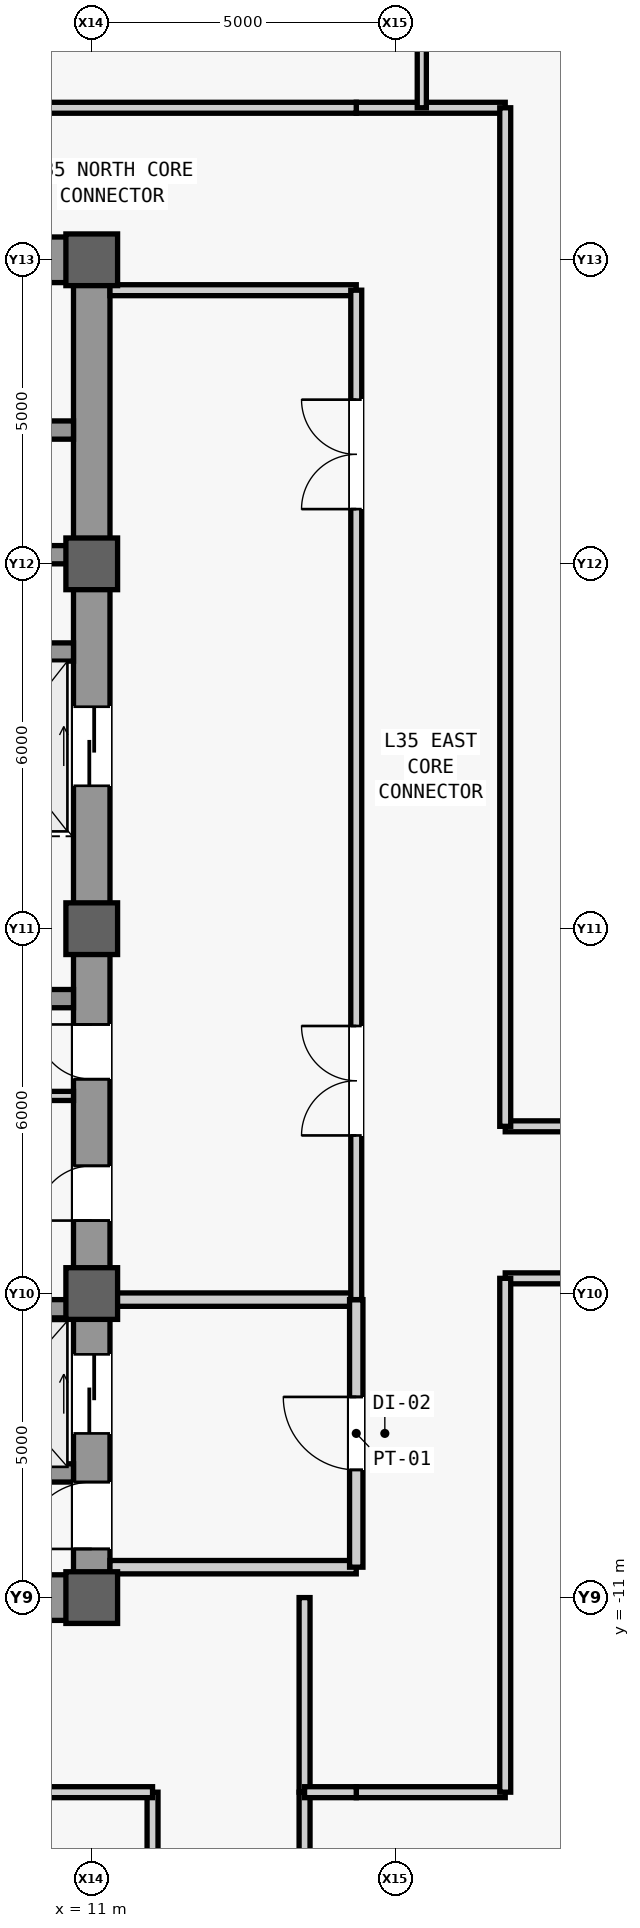
"""IFC4 building model, lengths in metres.
Left out: names, types, materials, properties, quantities, classifications, styles, units other than length and angle.
Written with IfcOpenShell. Run it as: python <this file> out.ifc"""

import sys

from ifc_helpers import new_model, si_unit, direction, frame, frame_2d, origin, origin_2d, place, context, subcontext, project, spatial, rectangle, extrude, source, transform, mapped, element, fill, save


model = new_model("IFC4")
c1 = context("Model", 3, precision=1e-05, world=origin(), true_north=direction((0.0, 1.0)))
c2 = subcontext(c1, "Body", "Model", "MODEL_VIEW")
j1 = project(units=[si_unit("LENGTHUNIT", "METRE"), si_unit("PLANEANGLEUNIT", "RADIAN")], contexts=[c1])
p1 = place(None, origin())
s1 = spatial("IfcSite", under=j1, at=p1, CompositionType="ELEMENT")
p2 = place(p1, origin())
s2 = spatial("IfcBuilding", under=s1, at=p2, CompositionType="ELEMENT")
p3 = place(p2, frame((0.0, 0.0, 155.1)))
s3 = spatial("IfcBuildingStorey", under=s2, at=p3, CompositionType="ELEMENT", Elevation=155.1)
m1 = source(origin(), c2, "Body", "SweptSolid", [
    extrude(rectangle(XDim=22.0, YDim=0.6, at=frame_2d((11.0, 0.0))), origin(), (0.0, 0.0, 1.0), 3.78),
])
p4 = place(p3, frame((11.0, -11.0, 0.0), z_axis=(0.0, 0.0, 1.0), x_axis=(0.0, 1.0, 0.0)))
e1 = element("IfcWall", 1, at=p4, inside=s3, PredefinedType="SHEAR", context=c2, shape_type="MappedRepresentation", body=[
    mapped(m1, transform((0.0, 0.0, 0.0), scale=1.0)),
])
m2 = source(origin(), c2, "Body", "SweptSolid", [
    extrude(rectangle(XDim=1.1, YDim=2.2, at=frame_2d((0.55, 1.1))), frame((0.0, 0.31, 0.0), z_axis=(0.0, -1.0, 0.0), x_axis=(1.0, 0.0, 0.0)), (0.0, 0.0, 1.0), 0.62),
])
p5 = place(p4, frame((0.8, 0.0, 0.0)))
e2 = element("IfcOpeningElement", 2, at=p5, cuts=e1, PredefinedType="OPENING", context=c2, shape_type="MappedRepresentation", body=[
    mapped(m2, transform((0.0, 0.0, 0.0), scale=1.0)),
])
m3 = source(origin(), c2, "Body", "SweptSolid", [
    extrude(rectangle(XDim=0.9, YDim=2.15, at=frame_2d((0.45, 1.075))), frame((0.0, 0.31, 0.0), z_axis=(0.0, -1.0, 0.0), x_axis=(1.0, 0.0, 0.0)), (0.0, 0.0, 1.0), 0.62),
])
p6 = place(p4, frame((6.2, 0.0, 0.0)))
e3 = element("IfcOpeningElement", 3, at=p6, cuts=e1, PredefinedType="OPENING", context=c2, shape_type="MappedRepresentation", body=[
    mapped(m3, transform((0.0, 0.0, 0.0), scale=1.0)),
])
p7 = place(p4, frame((8.525, 0.0, 0.0)))
e4 = element("IfcOpeningElement", 4, at=p7, cuts=e1, PredefinedType="OPENING", context=c2, shape_type="MappedRepresentation", body=[
    mapped(m3, transform((0.0, 0.0, 0.0), scale=1.0)),
])
m4 = source(origin(), c2, "Body", "SweptSolid", [
    extrude(rectangle(XDim=1.3, YDim=2.3, at=frame_2d((0.65, 1.15))), frame((0.0, 0.31, 0.0), z_axis=(0.0, -1.0, 0.0), x_axis=(1.0, 0.0, 0.0)), (0.0, 0.0, 1.0), 0.62),
])
p8 = place(p4, frame((2.7, 0.0, 0.0)))
e5 = element("IfcOpeningElement", 5, at=p8, cuts=e1, PredefinedType="OPENING", context=c2, shape_type="MappedRepresentation", body=[
    mapped(m4, transform((0.0, 0.0, 0.0), scale=1.0)),
])
p9 = place(p4, frame((13.35, 0.0, 0.0)))
e6 = element("IfcOpeningElement", 6, at=p9, cuts=e1, PredefinedType="OPENING", context=c2, shape_type="MappedRepresentation", body=[
    mapped(m4, transform((0.0, 0.0, 0.0), scale=1.0)),
])
m5 = source(origin(), c2, "Body", "SweptSolid", [
    extrude(rectangle(XDim=5.85, YDim=0.75, at=frame_2d((2.925, 0.0))), origin(), (0.0, 0.0, 1.0), 3.78),
])
p10 = place(p3, frame((4.85, -11.0, 0.0), z_axis=(0.0, 0.0, 1.0), x_axis=(1.0, 0.0, 0.0)))
e7 = element("IfcWall", 7, at=p10, inside=s3, PredefinedType="SHEAR", context=c2, shape_type="MappedRepresentation", body=[
    mapped(m5, transform((0.0, 0.0, 0.0), scale=1.0)),
])
p11 = place(p3, frame((4.85, 11.0, 0.0), z_axis=(0.0, 0.0, 1.0), x_axis=(1.0, 0.0, 0.0)))
e8 = element("IfcWall", 8, at=p11, inside=s3, PredefinedType="SHEAR", context=c2, shape_type="MappedRepresentation", body=[
    mapped(m5, transform((0.0, 0.0, 0.0), scale=1.0)),
])
m6 = source(origin(), c2, "Body", "SweptSolid", [
    extrude(rectangle(XDim=1.05, YDim=2.2, at=frame_2d((0.525, 1.1))), frame((0.0, 0.385, 0.0), z_axis=(0.0, -1.0, 0.0), x_axis=(1.0, 0.0, 0.0)), (0.0, 0.0, 1.0), 0.77),
])
p12 = place(p11, frame((1.375, 0.0, 0.0)))
e9 = element("IfcOpeningElement", 9, at=p12, cuts=e8, PredefinedType="OPENING", context=c2, shape_type="MappedRepresentation", body=[
    mapped(m6, transform((0.0, 0.0, 0.0), scale=1.0)),
])
m7 = source(origin(), c2, "Body", "SweptSolid", [
    extrude(rectangle(XDim=5.6, YDim=0.3, at=frame_2d((2.8, 0.0))), origin(), (0.0, 0.0, 1.0), 3.78),
])
p13 = place(p3, frame((5.1, -1.15, 0.0), z_axis=(0.0, 0.0, 1.0), x_axis=(1.0, 0.0, 0.0)))
e10 = element("IfcWall", 10, at=p13, inside=s3, PredefinedType="SHEAR", context=c2, shape_type="MappedRepresentation", body=[
    mapped(m7, transform((0.0, 0.0, 0.0), scale=1.0)),
])
m8 = source(origin(), c2, "Body", "SweptSolid", [
    extrude(rectangle(XDim=0.85, YDim=0.85, at=origin_2d()), origin(), (0.0, 0.0, 1.0), 4.0),
])
for number, where, z_axis, x_axis in (
    (11, (11.0, -11.0, 0.0), (0.0, 0.0, 1.0), (1.0, 0.0, 0.0)),
    (12, (11.0, -6.0, 0.0), (0.0, 0.0, 1.0), (1.0, 0.0, 0.0)),
    (13, (11.0, 0.0, 0.0), (0.0, 0.0, 1.0), (1.0, 0.0, 0.0)),
    (14, (11.0, 6.0, 0.0), (0.0, 0.0, 1.0), (1.0, 0.0, 0.0)),
    (15, (11.0, 11.0, 0.0), (0.0, 0.0, 1.0), (1.0, 0.0, 0.0)),
):
    element("IfcColumn", number, at=place(p3, frame(where, z_axis=z_axis, x_axis=x_axis)), inside=s3, PredefinedType="COLUMN", context=c2, shape_type="MappedRepresentation", body=[
        mapped(m8, transform((0.0, 0.0, 0.0), scale=1.0)),
    ])
m9 = source(origin(), c2, "Body", "SweptSolid", [
    extrude(rectangle(XDim=2.2, YDim=0.3, at=frame_2d((1.1, 0.0))), origin(), (0.0, 0.0, 1.0), 3.78),
])
for number, where, z_axis, x_axis in (
    (16, (8.5, -8.95, 0.0), (0.0, 0.0, 1.0), (1.0, 0.0, 0.0)),
    (17, (8.5, -6.25, 0.0), (0.0, 0.0, 1.0), (1.0, 0.0, 0.0)),
):
    element("IfcWall", number, at=place(p3, frame(where, z_axis=z_axis, x_axis=x_axis)), inside=s3, PredefinedType="SHEAR", context=c2, shape_type="MappedRepresentation", body=[
        mapped(m9, transform((0.0, 0.0, 0.0), scale=1.0)),
    ])
m10 = source(origin(), c2, "Body", "SweptSolid", [
    extrude(rectangle(XDim=2.3, YDim=0.3, at=frame_2d((1.15, 0.0))), origin(), (0.0, 0.0, 1.0), 3.78),
])
for number, where, z_axis, x_axis in (
    (18, (8.4, 4.55, 0.0), (0.0, 0.0, 1.0), (1.0, 0.0, 0.0)),
    (19, (8.4, 6.15, 0.0), (0.0, 0.0, 1.0), (1.0, 0.0, 0.0)),
    (20, (8.4, 8.2, 0.0), (0.0, 0.0, 1.0), (1.0, 0.0, 0.0)),
):
    element("IfcWall", number, at=place(p3, frame(where, z_axis=z_axis, x_axis=x_axis)), inside=s3, PredefinedType="SHEAR", context=c2, shape_type="MappedRepresentation", body=[
        mapped(m10, transform((0.0, 0.0, 0.0), scale=1.0)),
    ])
m11 = source(origin(), c2, "Body", "SweptSolid", [
    extrude(rectangle(XDim=2.05, YDim=0.15, at=frame_2d((1.025, 0.0))), origin(), (0.0, 0.0, 1.0), 3.78),
])
p14 = place(p3, frame((8.65, -2.75, 0.0), z_axis=(0.0, 0.0, 1.0), x_axis=(1.0, 0.0, 0.0)))
e21 = element("IfcWall", 21, at=p14, inside=s3, PredefinedType="PARTITIONING", context=c2, shape_type="MappedRepresentation", body=[
    mapped(m11, transform((0.0, 0.0, 0.0), scale=1.0)),
])
m12 = source(origin(), c2, "Body", "SweptSolid", [
    extrude(rectangle(XDim=4.05, YDim=0.22, at=frame_2d((2.025, 0.0))), origin(), (0.0, 0.0, 1.0), 3.78),
])
p15 = place(p3, frame((11.3, -10.5, 0.0), z_axis=(0.0, 0.0, 1.0), x_axis=(1.0, 0.0, 0.0)))
e22 = element("IfcWall", 22, at=p15, inside=s3, PredefinedType="PARTITIONING", context=c2, shape_type="MappedRepresentation", body=[
    mapped(m12, transform((0.0, 0.0, 0.0), scale=1.0)),
])
m13 = source(origin(), c2, "Body", "SweptSolid", [
    extrude(rectangle(XDim=4.05, YDim=0.22, at=frame_2d((2.025, 0.0))), origin(), (0.0, 0.0, 1.0), 3.007),
])
p16 = place(p3, frame((11.3, -6.1, 0.0), z_axis=(0.0, 0.0, 1.0), x_axis=(1.0, 0.0, 0.0)))
e23 = element("IfcWall", 23, at=p16, inside=s3, PredefinedType="PARTITIONING", context=c2, shape_type="MappedRepresentation", body=[
    mapped(m13, transform((0.0, 0.0, 0.0), scale=1.0)),
])
m14 = source(origin(), c2, "Body", "SweptSolid", [
    extrude(rectangle(XDim=4.4, YDim=0.22, at=frame_2d((2.2, 0.0))), origin(), (0.0, 0.0, 1.0), 3.78),
])
p17 = place(p3, frame((15.35, -10.5, 0.0), z_axis=(0.0, 0.0, 1.0), x_axis=(0.0, 1.0, 0.0)))
e24 = element("IfcWall", 24, at=p17, inside=s3, PredefinedType="PARTITIONING", context=c2, shape_type="MappedRepresentation", body=[
    mapped(m14, transform((0.0, 0.0, 0.0), scale=1.0)),
])
m15 = source(origin(), c2, "Body", "SweptSolid", [
    extrude(rectangle(XDim=1.2, YDim=2.2, at=frame_2d((0.6, 1.1))), frame((0.0, 0.12, 0.0), z_axis=(0.0, -1.0, 0.0), x_axis=(1.0, 0.0, 0.0)), (0.0, 0.0, 1.0), 0.24),
])
p18 = place(p17, frame((1.6, 0.0, 0.0)))
e25 = element("IfcOpeningElement", 25, at=p18, cuts=e24, PredefinedType="OPENING", context=c2, shape_type="MappedRepresentation", body=[
    mapped(m15, transform((0.0, 0.0, 0.0), scale=1.0)),
])
m16 = source(origin(), c2, "Body", "SweptSolid", [
    extrude(rectangle(XDim=4.05, YDim=0.18, at=frame_2d((2.025, 0.0))), origin(), (0.0, 0.0, 1.0), 3.78),
])
p19 = place(p3, frame((11.3, 10.5, 0.0), z_axis=(0.0, 0.0, 1.0), x_axis=(1.0, 0.0, 0.0)))
e26 = element("IfcWall", 26, at=p19, inside=s3, PredefinedType="PARTITIONING", context=c2, shape_type="MappedRepresentation", body=[
    mapped(m16, transform((0.0, 0.0, 0.0), scale=1.0)),
])
m17 = source(origin(), c2, "Body", "SweptSolid", [
    extrude(rectangle(XDim=16.6, YDim=0.18, at=frame_2d((8.3, 0.0))), origin(), (0.0, 0.0, 1.0), 3.78),
])
p20 = place(p3, frame((15.35, -6.1, 0.0), z_axis=(0.0, 0.0, 1.0), x_axis=(0.0, 1.0, 0.0)))
e27 = element("IfcWall", 27, at=p20, inside=s3, PredefinedType="PARTITIONING", context=c2, shape_type="MappedRepresentation", body=[
    mapped(m17, transform((0.0, 0.0, 0.0), scale=1.0)),
])
m18 = source(origin(), c2, "Body", "SweptSolid", [
    extrude(rectangle(XDim=1.8, YDim=2.25, at=frame_2d((0.9, 1.125))), frame((0.0, 0.1, 0.0), z_axis=(0.0, -1.0, 0.0), x_axis=(1.0, 0.0, 0.0)), (0.0, 0.0, 1.0), 0.2),
])
p21 = place(p20, frame((2.7, 0.0, 0.0)))
e28 = element("IfcOpeningElement", 28, at=p21, cuts=e27, PredefinedType="OPENING", context=c2, shape_type="MappedRepresentation", body=[
    mapped(m18, transform((0.0, 0.0, 0.0), scale=1.0)),
])
p22 = place(p20, frame((13.0, 0.0, 0.0)))
e29 = element("IfcOpeningElement", 29, at=p22, cuts=e27, PredefinedType="OPENING", context=c2, shape_type="MappedRepresentation", body=[
    mapped(m18, transform((0.0, 0.0, 0.0), scale=1.0)),
])
m19 = source(origin(), c2, "Body", "SweptSolid", [
    extrude(rectangle(XDim=2.45, YDim=0.18, at=frame_2d((1.225, 0.0))), origin(), (0.0, 0.0, 1.0), 3.78),
])
for number, where, z_axis, x_axis in (
    (30, (15.35, -14.2, 0.0), (0.0, 0.0, 1.0), (1.0, 0.0, 0.0)),
    (31, (15.35, 13.5, 0.0), (0.0, 0.0, 1.0), (1.0, 0.0, 0.0)),
):
    element("IfcWall", number, at=place(p3, frame(where, z_axis=z_axis, x_axis=x_axis)), inside=s3, PredefinedType="PARTITIONING", context=c2, shape_type="MappedRepresentation", body=[
        mapped(m19, transform((0.0, 0.0, 0.0), scale=1.0)),
    ])
m20 = source(origin(), c2, "Body", "SweptSolid", [
    extrude(rectangle(XDim=3.2, YDim=0.18, at=frame_2d((1.6, 0.0))), origin(), (0.0, 0.0, 1.0), 3.78),
])
p23 = place(p3, frame((14.5, -14.2, 0.0), z_axis=(0.0, 0.0, 1.0), x_axis=(0.0, 1.0, 0.0)))
e32 = element("IfcWall", 32, at=p23, inside=s3, PredefinedType="PARTITIONING", context=c2, shape_type="MappedRepresentation", body=[
    mapped(m20, transform((0.0, 0.0, 0.0), scale=1.0)),
])
m21 = source(origin(), c2, "Body", "SweptSolid", [
    extrude(rectangle(XDim=15.8, YDim=0.18, at=frame_2d((7.9, 0.0))), origin(), (0.0, 0.0, 1.0), 3.78),
])
p24 = place(p3, frame((12.0, -30.0, 0.0), z_axis=(0.0, 0.0, 1.0), x_axis=(0.0, 1.0, 0.0)))
e33 = element("IfcWall", 33, at=p24, inside=s3, PredefinedType="PARTITIONING", context=c2, shape_type="MappedRepresentation", body=[
    mapped(m21, transform((0.0, 0.0, 0.0), scale=1.0)),
])
m22 = source(origin(), c2, "Body", "SweptSolid", [
    extrude(rectangle(XDim=1.05, YDim=2.2, at=frame_2d((0.525, 1.1))), frame((0.0, 0.1, 0.0), z_axis=(0.0, -1.0, 0.0), x_axis=(1.0, 0.0, 0.0)), (0.0, 0.0, 1.0), 0.2),
])
p25 = place(p24, frame((3.425, 0.0, 0.0)))
e34 = element("IfcOpeningElement", 34, at=p25, cuts=e33, PredefinedType="OPENING", context=c2, shape_type="MappedRepresentation", body=[
    mapped(m22, transform((0.0, 0.0, 0.0), scale=1.0)),
])
m23 = source(origin(), c2, "Body", "SweptSolid", [
    extrude(rectangle(XDim=27.35, YDim=0.18, at=frame_2d((13.675, 0.0))), origin(), (0.0, 0.0, 1.0), 3.78),
])
p26 = place(p3, frame((-15.35, -14.2, 0.0), z_axis=(0.0, 0.0, 1.0), x_axis=(1.0, 0.0, 0.0)))
e35 = element("IfcWall", 35, at=p26, inside=s3, PredefinedType="PARTITIONING", context=c2, shape_type="MappedRepresentation", body=[
    mapped(m23, transform((0.0, 0.0, 0.0), scale=1.0)),
])
p27 = place(p3, frame((14.5, -30.0, 0.0), z_axis=(0.0, 0.0, 1.0), x_axis=(0.0, 1.0, 0.0)))
e36 = element("IfcWall", 36, at=p27, inside=s3, PredefinedType="PARTITIONING", context=c2, shape_type="MappedRepresentation", body=[
    mapped(m21, transform((0.0, 0.0, 0.0), scale=1.0)),
])
p28 = place(p27, frame((3.425, 0.0, 0.0)))
e37 = element("IfcOpeningElement", 37, at=p28, cuts=e36, PredefinedType="OPENING", context=c2, shape_type="MappedRepresentation", body=[
    mapped(m22, transform((0.0, 0.0, 0.0), scale=1.0)),
])
m24 = source(origin(), c2, "Body", "SweptSolid", [
    extrude(rectangle(XDim=0.85, YDim=0.18, at=frame_2d((0.425, 0.0))), origin(), (0.0, 0.0, 1.0), 3.78),
])
p29 = place(p3, frame((14.5, -14.2, 0.0), z_axis=(0.0, 0.0, 1.0), x_axis=(1.0, 0.0, 0.0)))
e38 = element("IfcWall", 38, at=p29, inside=s3, PredefinedType="PARTITIONING", context=c2, shape_type="MappedRepresentation", body=[
    mapped(m24, transform((0.0, 0.0, 0.0), scale=1.0)),
])
m25 = source(origin(), c2, "Body", "SweptSolid", [
    extrude(rectangle(XDim=16.5, YDim=0.15, at=frame_2d((8.25, 0.0))), origin(), (0.0, 0.0, 1.0), 3.78),
])
p30 = place(p3, frame((16.428, 13.5, 0.0), z_axis=(0.0, 0.0, 1.0), x_axis=(0.0, 1.0, 0.0)))
e39 = element("IfcWall", 39, at=p30, inside=s3, PredefinedType="PARTITIONING", context=c2, shape_type="MappedRepresentation", body=[
    mapped(m25, transform((0.0, 0.0, 0.0), scale=1.0)),
])
m26 = source(origin(), c2, "Body", "SweptSolid", [
    extrude(rectangle(XDim=0.95, YDim=2.15, at=frame_2d((0.475, 1.075))), frame((0.0, 0.085, 0.0), z_axis=(0.0, -1.0, 0.0), x_axis=(1.0, 0.0, 0.0)), (0.0, 0.0, 1.0), 0.17),
])
p31 = place(p30, frame((11.9, 0.0, 0.0)))
e40 = element("IfcOpeningElement", 40, at=p31, cuts=e39, PredefinedType="OPENING", context=c2, shape_type="MappedRepresentation", body=[
    mapped(m26, transform((0.0, 0.0, 0.0), scale=1.0)),
])
m27 = source(origin(), c2, "Body", "SweptSolid", [
    extrude(rectangle(XDim=11.45, YDim=0.18, at=frame_2d((5.725, 0.0))), origin(), (0.0, 0.0, 1.0), 3.78),
])
p32 = place(p3, frame((3.9, 13.5, 0.0), z_axis=(0.0, 0.0, 1.0), x_axis=(1.0, 0.0, 0.0)))
e41 = element("IfcWall", 41, at=p32, inside=s3, PredefinedType="PARTITIONING", context=c2, shape_type="MappedRepresentation", body=[
    mapped(m27, transform((0.0, 0.0, 0.0), scale=1.0)),
])
m28 = source(origin(), c2, "Body", "SweptSolid", [
    extrude(rectangle(XDim=12.2, YDim=0.18, at=frame_2d((6.1, 0.0))), origin(), (0.0, 0.0, 1.0), 3.007),
])
p33 = place(p3, frame((17.8, -5.75, 0.0), z_axis=(0.0, 0.0, 1.0), x_axis=(1.0, 0.0, 0.0)))
e42 = element("IfcWall", 42, at=p33, inside=s3, PredefinedType="PARTITIONING", context=c2, shape_type="MappedRepresentation", body=[
    mapped(m28, transform((0.0, 0.0, 0.0), scale=1.0)),
])
m29 = source(origin(), c2, "Body", "SweptSolid", [
    extrude(rectangle(XDim=0.95, YDim=2.15, at=frame_2d((0.475, 1.075))), frame((0.0, 0.1, 0.0), z_axis=(0.0, -1.0, 0.0), x_axis=(1.0, 0.0, 0.0)), (0.0, 0.0, 1.0), 0.2),
])
p34 = place(p33, frame((2.758, 0.0, 0.0)))
e43 = element("IfcOpeningElement", 43, at=p34, cuts=e42, PredefinedType="OPENING", context=c2, shape_type="MappedRepresentation", body=[
    mapped(m29, transform((0.0, 0.0, 0.0), scale=1.0)),
])
p35 = place(p33, frame((8.858, 0.0, 0.0)))
e44 = element("IfcOpeningElement", 44, at=p35, cuts=e42, PredefinedType="OPENING", context=c2, shape_type="MappedRepresentation", body=[
    mapped(m29, transform((0.0, 0.0, 0.0), scale=1.0)),
])
m30 = source(origin(), c2, "Body", "SweptSolid", [
    extrude(rectangle(XDim=8.45, YDim=0.18, at=frame_2d((4.225, 0.0))), origin(), (0.0, 0.0, 1.0), 3.78),
])
p36 = place(p3, frame((17.8, -14.2, 0.0), z_axis=(0.0, 0.0, 1.0), x_axis=(0.0, 1.0, 0.0)))
e45 = element("IfcWall", 45, at=p36, inside=s3, PredefinedType="PARTITIONING", context=c2, shape_type="MappedRepresentation", body=[
    mapped(m30, transform((0.0, 0.0, 0.0), scale=1.0)),
])
m31 = source(origin(), c2, "Body", "SweptSolid", [
    extrude(rectangle(XDim=12.2, YDim=0.18, at=frame_2d((6.1, 0.0))), origin(), (0.0, 0.0, 1.0), 3.78),
])
p37 = place(p3, frame((17.8, -3.25, 0.0), z_axis=(0.0, 0.0, 1.0), x_axis=(1.0, 0.0, 0.0)))
e46 = element("IfcWall", 46, at=p37, inside=s3, PredefinedType="PARTITIONING", context=c2, shape_type="MappedRepresentation", body=[
    mapped(m31, transform((0.0, 0.0, 0.0), scale=1.0)),
])
p38 = place(p37, frame((5.625, 0.0, 0.0)))
e47 = element("IfcOpeningElement", 47, at=p38, cuts=e46, PredefinedType="OPENING", context=c2, shape_type="MappedRepresentation", body=[
    mapped(m29, transform((0.0, 0.0, 0.0), scale=1.0)),
])
m32 = source(origin(), c2, "Body", "SweptSolid", [
    extrude(rectangle(XDim=16.75, YDim=0.18, at=frame_2d((8.375, 0.0))), origin(), (0.0, 0.0, 1.0), 3.78),
])
p39 = place(p3, frame((17.8, -3.25, 0.0), z_axis=(0.0, 0.0, 1.0), x_axis=(0.0, 1.0, 0.0)))
e48 = element("IfcWall", 48, at=p39, inside=s3, PredefinedType="PARTITIONING", context=c2, shape_type="MappedRepresentation", body=[
    mapped(m32, transform((0.0, 0.0, 0.0), scale=1.0)),
])
m33 = source(origin(), c2, "Body", "SweptSolid", [
    extrude(rectangle(XDim=1.1, YDim=2.2, at=frame_2d((0.55, 1.1))), frame((0.0, 0.025, 0.0), z_axis=(0.0, -1.0, 0.0), x_axis=(1.0, 0.0, 0.0)), (0.0, 0.0, 1.0), 0.05),
])
p40 = place(p5, origin())
e49 = element("IfcDoor", 49, at=p40, inside=s3, OperationType="SINGLE_SWING_LEFT", PredefinedType="DOOR", context=c2, shape_type="MappedRepresentation", body=[
    mapped(m33, transform((0.0, 0.0, 0.0), scale=1.0)),
])
fill(e2, e49)
m34 = source(origin(), c2, "Body", "SweptSolid", [
    extrude(rectangle(XDim=0.9, YDim=2.15, at=frame_2d((0.45, 1.075))), frame((0.0, 0.025, 0.0), z_axis=(0.0, -1.0, 0.0), x_axis=(1.0, 0.0, 0.0)), (0.0, 0.0, 1.0), 0.05),
])
p41 = place(p6, origin())
e50 = element("IfcDoor", 50, at=p41, inside=s3, OperationType="SINGLE_SWING_LEFT", PredefinedType="DOOR", context=c2, shape_type="MappedRepresentation", body=[
    mapped(m34, transform((0.0, 0.0, 0.0), scale=1.0)),
])
fill(e3, e50)
p42 = place(p7, origin())
e51 = element("IfcDoor", 51, at=p42, inside=s3, OperationType="SINGLE_SWING_RIGHT", PredefinedType="DOOR", context=c2, shape_type="MappedRepresentation", body=[
    mapped(m34, transform((0.0, 0.0, 0.0), scale=1.0)),
])
fill(e4, e51)
m35 = source(origin(), c2, "Body", "SweptSolid", [
    extrude(rectangle(XDim=1.2, YDim=2.2, at=frame_2d((0.6, 1.1))), frame((0.0, 0.025, 0.0), z_axis=(0.0, -1.0, 0.0), x_axis=(1.0, 0.0, 0.0)), (0.0, 0.0, 1.0), 0.05),
])
p43 = place(p18, origin())
e52 = element("IfcDoor", 52, at=p43, inside=s3, OperationType="SINGLE_SWING_RIGHT", PredefinedType="DOOR", context=c2, shape_type="MappedRepresentation", body=[
    mapped(m35, transform((0.0, 0.0, 0.0), scale=1.0)),
])
fill(e25, e52)
m36 = source(origin(), c2, "Body", "SweptSolid", [
    extrude(rectangle(XDim=1.8, YDim=2.25, at=frame_2d((0.9, 1.125))), frame((0.0, 0.025, 0.0), z_axis=(0.0, -1.0, 0.0), x_axis=(1.0, 0.0, 0.0)), (0.0, 0.0, 1.0), 0.05),
])
p44 = place(p21, origin())
e53 = element("IfcDoor", 53, at=p44, inside=s3, OperationType="SINGLE_SWING_RIGHT", PredefinedType="DOOR", context=c2, shape_type="MappedRepresentation", body=[
    mapped(m36, transform((0.0, 0.0, 0.0), scale=1.0)),
])
fill(e28, e53)
p45 = place(p22, origin())
e54 = element("IfcDoor", 54, at=p45, inside=s3, OperationType="SINGLE_SWING_LEFT", PredefinedType="DOOR", context=c2, shape_type="MappedRepresentation", body=[
    mapped(m36, transform((0.0, 0.0, 0.0), scale=1.0)),
])
fill(e29, e54)
m37 = source(origin(), c2, "Body", "SweptSolid", [
    extrude(rectangle(XDim=1.3, YDim=2.3, at=frame_2d((0.65, 1.15))), frame((0.0, 0.025, 0.0), z_axis=(0.0, -1.0, 0.0), x_axis=(1.0, 0.0, 0.0)), (0.0, 0.0, 1.0), 0.05),
])
p46 = place(p8, origin())
e55 = element("IfcDoor", 55, at=p46, inside=s3, OperationType="SLIDING_TO_LEFT", PredefinedType="DOOR", context=c2, shape_type="MappedRepresentation", body=[
    mapped(m37, transform((0.0, 0.0, 0.0), scale=1.0)),
])
fill(e5, e55)
p47 = place(p9, origin())
e56 = element("IfcDoor", 56, at=p47, inside=s3, OperationType="SLIDING_TO_LEFT", PredefinedType="DOOR", context=c2, shape_type="MappedRepresentation", body=[
    mapped(m37, transform((0.0, 0.0, 0.0), scale=1.0)),
])
fill(e6, e56)
save(model, sys.argv[1])
